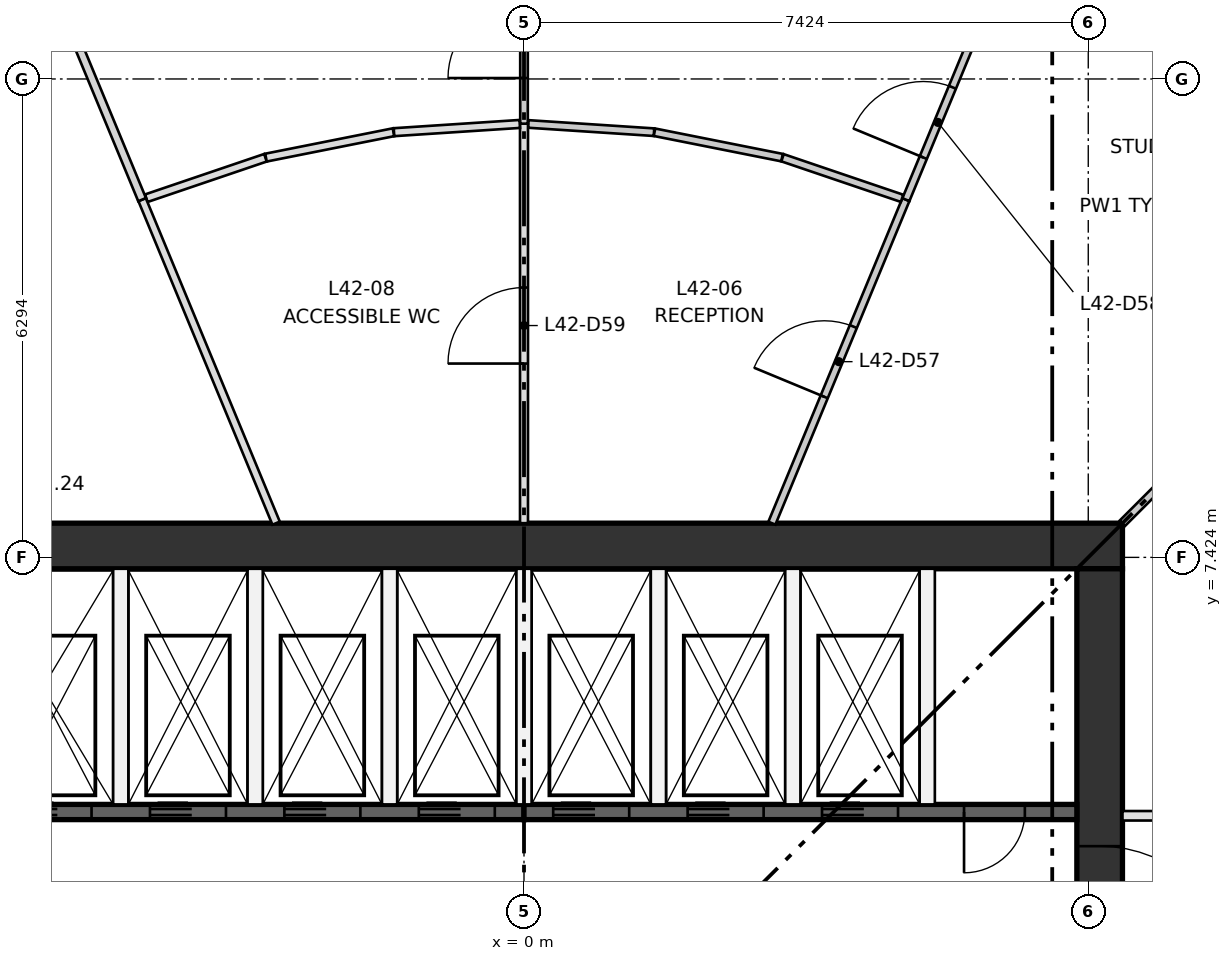
"""IFC4 building model, lengths in metres.
Left out: names, types, materials, properties, quantities, classifications, styles, units other than length and angle.
Written with IfcOpenShell. Run it as: python <this file> out.ifc"""

import sys

from ifc_helpers import new_model, si_unit, direction, frame, frame_2d, origin, place, context, subcontext, project, spatial, rectangle, extrude, element, fill, save


model = new_model("IFC4")
c1 = context("Model", 3, precision=1e-05, world=origin(), true_north=direction((0.0, 1.0)))
c2 = subcontext(c1, "Body", "Model", "MODEL_VIEW")
j1 = project(units=[si_unit("LENGTHUNIT", "METRE"), si_unit("PLANEANGLEUNIT", "RADIAN")], contexts=[c1])
p1 = place(None, origin())
s1 = spatial("IfcSite", under=j1, at=p1, CompositionType="ELEMENT")
p2 = place(p1, origin())
s2 = spatial("IfcBuilding", under=s1, at=p2, CompositionType="ELEMENT")
p3 = place(p2, frame((0.0, 0.0, 157.8)))
s3 = spatial("IfcBuildingStorey", under=s2, at=p3, CompositionType="ELEMENT", Elevation=157.8)
p4 = place(p3, frame((-7.874, 7.574, 0.0), z_axis=(0.0, 0.0, 1.0), x_axis=(1.0, 0.0, 0.0)))
e1 = element("IfcWall", 1, at=p4, inside=s3, PredefinedType="SHEAR", context=c2, shape_type="SweptSolid", body=[
    extrude(rectangle(XDim=15.748, YDim=0.6, at=frame_2d((7.874, 0.0))), origin(), (0.0, 0.0, 1.0), 3.35),
])
p5 = place(p3, frame((7.574, -7.274, 0.0), z_axis=(0.0, 0.0, 1.0), x_axis=(0.0, 1.0, 0.0)))
e2 = element("IfcWall", 2, at=p5, inside=s3, PredefinedType="SHEAR", context=c2, shape_type="SweptSolid", body=[
    extrude(rectangle(XDim=14.548, YDim=0.6, at=frame_2d((7.274, 0.0))), origin(), (0.0, 0.0, 1.0), 3.35),
])
p6 = place(p5, frame((6.774, 0.0, 0.0)))
e3 = element("IfcOpeningElement", 3, at=p6, cuts=e2, PredefinedType="OPENING", context=c2, shape_type="SweptSolid", body=[
    extrude(rectangle(XDim=1.0, YDim=2.1, at=frame_2d((0.5, 1.05))), frame((0.0, 0.31, 0.0), z_axis=(0.0, -1.0, 0.0), x_axis=(1.0, 0.0, 0.0)), (0.0, 0.0, 1.0), 0.62),
])
p7 = place(p5, frame((3.649, 0.0, 0.0)))
e4 = element("IfcOpeningElement", 4, at=p7, cuts=e2, PredefinedType="OPENING", context=c2, shape_type="SweptSolid", body=[
    extrude(rectangle(XDim=1.8, YDim=2.1, at=frame_2d((0.9, 1.05))), frame((0.0, 0.31, 0.0), z_axis=(0.0, -1.0, 0.0), x_axis=(1.0, 0.0, 0.0)), (0.0, 0.0, 1.0), 0.62),
])
p8 = place(p5, frame((9.098, 0.0, 0.0)))
e5 = element("IfcOpeningElement", 5, at=p8, cuts=e2, PredefinedType="OPENING", context=c2, shape_type="SweptSolid", body=[
    extrude(rectangle(XDim=1.8, YDim=2.1, at=frame_2d((0.9, 1.05))), frame((0.0, 0.31, 0.0), z_axis=(0.0, -1.0, 0.0), x_axis=(1.0, 0.0, 0.0)), (0.0, 0.0, 1.0), 0.62),
])
p9 = place(p3, frame((-7.274, 4.074, 0.0), z_axis=(0.0, 0.0, 1.0), x_axis=(1.0, 0.0, 0.0)))
e6 = element("IfcWall", 6, at=p9, inside=s3, PredefinedType="SHEAR", context=c2, shape_type="SweptSolid", body=[
    extrude(rectangle(XDim=7.274, YDim=0.2, at=frame_2d((3.637, 0.0))), origin(), (0.0, 0.0, 1.0), 3.0),
])
p10 = place(p9, frame((0.584, 0.0, 0.0)))
e7 = element("IfcOpeningElement", 7, at=p10, cuts=e6, PredefinedType="OPENING", context=c2, shape_type="SweptSolid", body=[
    extrude(rectangle(XDim=1.0, YDim=2.1, at=frame_2d((0.5, 1.05))), frame((0.0, 0.11, 0.0), z_axis=(0.0, -1.0, 0.0), x_axis=(1.0, 0.0, 0.0)), (0.0, 0.0, 1.0), 0.22),
])
p11 = place(p9, frame((2.353, 0.0, 0.0)))
e8 = element("IfcOpeningElement", 8, at=p11, cuts=e6, PredefinedType="OPENING", context=c2, shape_type="SweptSolid", body=[
    extrude(rectangle(XDim=1.0, YDim=2.1, at=frame_2d((0.5, 1.05))), frame((0.0, 0.11, 0.0), z_axis=(0.0, -1.0, 0.0), x_axis=(1.0, 0.0, 0.0)), (0.0, 0.0, 1.0), 0.22),
])
p12 = place(p9, frame((4.121, 0.0, 0.0)))
e9 = element("IfcOpeningElement", 9, at=p12, cuts=e6, PredefinedType="OPENING", context=c2, shape_type="SweptSolid", body=[
    extrude(rectangle(XDim=1.0, YDim=2.1, at=frame_2d((0.5, 1.05))), frame((0.0, 0.11, 0.0), z_axis=(0.0, -1.0, 0.0), x_axis=(1.0, 0.0, 0.0)), (0.0, 0.0, 1.0), 0.22),
])
p13 = place(p9, frame((5.89, 0.0, 0.0)))
e10 = element("IfcOpeningElement", 10, at=p13, cuts=e6, PredefinedType="OPENING", context=c2, shape_type="SweptSolid", body=[
    extrude(rectangle(XDim=1.0, YDim=2.1, at=frame_2d((0.5, 1.05))), frame((0.0, 0.11, 0.0), z_axis=(0.0, -1.0, 0.0), x_axis=(1.0, 0.0, 0.0)), (0.0, 0.0, 1.0), 0.22),
])
p14 = place(p3, frame((0.0, 4.074, 0.0), z_axis=(0.0, 0.0, 1.0), x_axis=(1.0, 0.0, 0.0)))
e11 = element("IfcWall", 11, at=p14, inside=s3, PredefinedType="SHEAR", context=c2, shape_type="SweptSolid", body=[
    extrude(rectangle(XDim=7.274, YDim=0.2, at=frame_2d((3.637, 0.0))), origin(), (0.0, 0.0, 1.0), 3.0),
])
p15 = place(p14, frame((0.384, 0.0, 0.0)))
e12 = element("IfcOpeningElement", 12, at=p15, cuts=e11, PredefinedType="OPENING", context=c2, shape_type="SweptSolid", body=[
    extrude(rectangle(XDim=1.0, YDim=2.1, at=frame_2d((0.5, 1.05))), frame((0.0, 0.11, 0.0), z_axis=(0.0, -1.0, 0.0), x_axis=(1.0, 0.0, 0.0)), (0.0, 0.0, 1.0), 0.22),
])
p16 = place(p14, frame((2.153, 0.0, 0.0)))
e13 = element("IfcOpeningElement", 13, at=p16, cuts=e11, PredefinedType="OPENING", context=c2, shape_type="SweptSolid", body=[
    extrude(rectangle(XDim=1.0, YDim=2.1, at=frame_2d((0.5, 1.05))), frame((0.0, 0.11, 0.0), z_axis=(0.0, -1.0, 0.0), x_axis=(1.0, 0.0, 0.0)), (0.0, 0.0, 1.0), 0.22),
])
p17 = place(p14, frame((3.921, 0.0, 0.0)))
e14 = element("IfcOpeningElement", 14, at=p17, cuts=e11, PredefinedType="OPENING", context=c2, shape_type="SweptSolid", body=[
    extrude(rectangle(XDim=1.0, YDim=2.1, at=frame_2d((0.5, 1.05))), frame((0.0, 0.11, 0.0), z_axis=(0.0, -1.0, 0.0), x_axis=(1.0, 0.0, 0.0)), (0.0, 0.0, 1.0), 0.22),
])
p18 = place(p14, frame((5.79, 0.0, 0.0)))
e15 = element("IfcOpeningElement", 15, at=p18, cuts=e11, PredefinedType="OPENING", context=c2, shape_type="SweptSolid", body=[
    extrude(rectangle(XDim=0.8, YDim=2.1, at=frame_2d((0.4, 1.05))), frame((0.0, 0.11, 0.0), z_axis=(0.0, -1.0, 0.0), x_axis=(1.0, 0.0, 0.0)), (0.0, 0.0, 1.0), 0.22),
])
for number, where, z_axis, x_axis in (
    (16, (-5.305, 4.174, 0.0), (0.0, 0.0, 1.0), (0.0, 1.0, 0.0)),
    (17, (-3.537, 4.174, 0.0), (0.0, 0.0, 1.0), (0.0, 1.0, 0.0)),
    (18, (-1.769, 4.174, 0.0), (0.0, 0.0, 1.0), (0.0, 1.0, 0.0)),
    (19, (0.0, 4.174, 0.0), (0.0, 0.0, 1.0), (0.0, 1.0, 0.0)),
    (20, (1.769, 4.174, 0.0), (0.0, 0.0, 1.0), (0.0, 1.0, 0.0)),
    (21, (3.537, 4.174, 0.0), (0.0, 0.0, 1.0), (0.0, 1.0, 0.0)),
    (22, (5.305, 4.174, 0.0), (0.0, 0.0, 1.0), (0.0, 1.0, 0.0)),
):
    element("IfcWall", number, at=place(p3, frame(where, z_axis=z_axis, x_axis=x_axis)), inside=s3, PredefinedType="PARTITIONING", context=c2, shape_type="SweptSolid", body=[
        extrude(rectangle(XDim=3.1, YDim=0.2, at=frame_2d((1.55, 0.0))), origin(), (0.0, 0.0, 1.0), 3.0),
    ])
p19 = place(p3, frame((7.874, 4.024, 0.0), z_axis=(0.0, 0.0, 1.0), x_axis=(1.0, 0.0, 0.0)))
e23 = element("IfcWall", 23, at=p19, inside=s3, PredefinedType="PARTITIONING", context=c2, shape_type="SweptSolid", body=[
    extrude(rectangle(XDim=5.036, YDim=0.125, at=frame_2d((2.518, 0.0))), origin(), (0.0, 0.0, 1.0), 3.0),
])
p20 = place(p19, frame((2.0, 0.0, 0.0)))
e24 = element("IfcOpeningElement", 24, at=p20, cuts=e23, PredefinedType="OPENING", context=c2, shape_type="SweptSolid", body=[
    extrude(rectangle(XDim=1.0, YDim=2.1, at=frame_2d((0.5, 1.05))), frame((0.0, 0.073, 0.0), z_axis=(0.0, -1.0, 0.0), x_axis=(1.0, 0.0, 0.0)), (0.0, 0.0, 1.0), 0.145),
])
p21 = place(p3, frame((7.874, 7.874, 0.0), z_axis=(0.0, 0.0, 1.0), x_axis=(0.707106781187, 0.707106781187, 0.0)))
e25 = element("IfcWall", 25, at=p21, inside=s3, PredefinedType="PARTITIONING", context=c2, shape_type="SweptSolid", body=[
    extrude(rectangle(XDim=6.564, YDim=0.1, at=frame_2d((3.282, 0.0))), origin(), (0.0, 0.0, 1.0), 3.0),
])
p22 = place(p21, frame((2.5, 0.0, 0.0)))
e26 = element("IfcOpeningElement", 26, at=p22, cuts=e25, PredefinedType="OPENING", context=c2, shape_type="SweptSolid", body=[
    extrude(rectangle(XDim=1.0, YDim=2.1, at=frame_2d((0.5, 1.05))), frame((0.0, 0.06, 0.0), z_axis=(0.0, -1.0, 0.0), x_axis=(1.0, 0.0, 0.0)), (0.0, 0.0, 1.0), 0.12),
])
p23 = place(p3, frame((3.261, 7.874, 0.0), z_axis=(0.0, 0.0, 1.0), x_axis=(0.382691869474, 0.923876037701, 0.0)))
e27 = element("IfcWall", 27, at=p23, inside=s3, PredefinedType="PARTITIONING", context=c2, shape_type="SweptSolid", body=[
    extrude(rectangle(XDim=4.607, YDim=0.1, at=frame_2d((2.304, 0.0))), origin(), (0.0, 0.0, 1.0), 3.0),
])
p24 = place(p23, frame((1.8, 0.0, 0.0)))
e28 = element("IfcOpeningElement", 28, at=p24, cuts=e27, PredefinedType="OPENING", context=c2, shape_type="SweptSolid", body=[
    extrude(rectangle(XDim=1.0, YDim=2.1, at=frame_2d((0.5, 1.05))), frame((0.0, 0.06, 0.0), z_axis=(0.0, -1.0, 0.0), x_axis=(1.0, 0.0, 0.0)), (0.0, 0.0, 1.0), 0.12),
])
p25 = place(p3, frame((5.025, 12.131, 0.0), z_axis=(0.0, 0.0, 1.0), x_axis=(0.382664766489, 0.923887263949, 0.0)))
e29 = element("IfcWall", 29, at=p25, inside=s3, PredefinedType="PARTITIONING", context=c2, shape_type="SweptSolid", body=[
    extrude(rectangle(XDim=4.57, YDim=0.1, at=frame_2d((2.285, 0.0))), origin(), (0.0, 0.0, 1.0), 3.0),
])
p26 = place(p25, frame((0.6, 0.0, 0.0)))
e30 = element("IfcOpeningElement", 30, at=p26, cuts=e29, PredefinedType="OPENING", context=c2, shape_type="SweptSolid", body=[
    extrude(rectangle(XDim=1.0, YDim=2.1, at=frame_2d((0.5, 1.05))), frame((0.0, 0.06, 0.0), z_axis=(0.0, -1.0, 0.0), x_axis=(1.0, 0.0, 0.0)), (0.0, 0.0, 1.0), 0.12),
])
p27 = place(p3, frame((0.056, 13.126, 0.0), z_axis=(0.0, 0.0, 1.0), x_axis=(0.997860729897, -0.065375559108, 0.0)))
e31 = element("IfcWall", 31, at=p27, inside=s3, PredefinedType="PARTITIONING", context=c2, shape_type="SweptSolid", body=[
    extrude(rectangle(XDim=1.658, YDim=0.1, at=frame_2d((0.829, 0.0))), origin(), (0.0, 0.0, 1.0), 3.0),
])
p28 = place(p3, frame((1.717, 13.017, 0.0), z_axis=(0.0, 0.0, 1.0), x_axis=(0.980761373858, -0.195210469873, 0.0)))
e32 = element("IfcWall", 32, at=p28, inside=s3, PredefinedType="PARTITIONING", context=c2, shape_type="SweptSolid", body=[
    extrude(rectangle(XDim=1.711, YDim=0.1, at=frame_2d((0.855, 0.0))), origin(), (0.0, 0.0, 1.0), 3.0),
])
p29 = place(p3, frame((3.401, 12.681, 0.0), z_axis=(0.0, 0.0, 1.0), x_axis=(0.946964323191, -0.321338716314, 0.0)))
e33 = element("IfcWall", 33, at=p29, inside=s3, PredefinedType="PARTITIONING", context=c2, shape_type="SweptSolid", body=[
    extrude(rectangle(XDim=1.661, YDim=0.1, at=frame_2d((0.831, 0.0))), origin(), (0.0, 0.0, 1.0), 3.0),
])
p30 = place(p3, frame((0.0, 7.874, 0.0), z_axis=(0.0, 0.0, 1.0), x_axis=(0.0, 1.0, 0.0)))
e34 = element("IfcWall", 34, at=p30, inside=s3, PredefinedType="PARTITIONING", context=c2, shape_type="SweptSolid", body=[
    extrude(rectangle(XDim=5.256, YDim=0.105, at=frame_2d((2.628, 0.0))), origin(), (0.0, 0.0, 1.0), 3.0),
])
p31 = place(p30, frame((2.1, 0.0, 0.0)))
e35 = element("IfcOpeningElement", 35, at=p31, cuts=e34, PredefinedType="OPENING", context=c2, shape_type="SweptSolid", body=[
    extrude(rectangle(XDim=1.0, YDim=2.1, at=frame_2d((0.5, 1.05))), frame((0.0, 0.062, 0.0), z_axis=(0.0, -1.0, 0.0), x_axis=(1.0, 0.0, 0.0)), (0.0, 0.0, 1.0), 0.125),
])
p32 = place(p3, frame((0.0, 13.13, 0.0), z_axis=(0.0, 0.0, 1.0), x_axis=(0.0, 1.0, 0.0)))
e36 = element("IfcWall", 36, at=p32, inside=s3, PredefinedType="PARTITIONING", context=c2, shape_type="SweptSolid", body=[
    extrude(rectangle(XDim=4.57, YDim=0.1, at=frame_2d((2.285, 0.0))), origin(), (0.0, 0.0, 1.0), 3.0),
])
p33 = place(p32, frame((0.6, 0.0, 0.0)))
e37 = element("IfcOpeningElement", 37, at=p33, cuts=e36, PredefinedType="OPENING", context=c2, shape_type="SweptSolid", body=[
    extrude(rectangle(XDim=1.0, YDim=2.1, at=frame_2d((0.5, 1.05))), frame((0.0, 0.06, 0.0), z_axis=(0.0, -1.0, 0.0), x_axis=(1.0, 0.0, 0.0)), (0.0, 0.0, 1.0), 0.12),
])
p34 = place(p3, frame((-4.969, 12.149, 0.0), z_axis=(0.0, 0.0, 1.0), x_axis=(0.946958666381, 0.321355386084, 0.0)))
e38 = element("IfcWall", 38, at=p34, inside=s3, PredefinedType="PARTITIONING", context=c2, shape_type="SweptSolid", body=[
    extrude(rectangle(XDim=1.656, YDim=0.105, at=frame_2d((0.828, 0.0))), origin(), (0.0, 0.0, 1.0), 3.0),
])
p35 = place(p3, frame((-3.395, 12.683, 0.0), z_axis=(0.0, 0.0, 1.0), x_axis=(0.980783253741, 0.195100510458, 0.0)))
e39 = element("IfcWall", 39, at=p35, inside=s3, PredefinedType="PARTITIONING", context=c2, shape_type="SweptSolid", body=[
    extrude(rectangle(XDim=1.711, YDim=0.105, at=frame_2d((0.855, 0.0))), origin(), (0.0, 0.0, 1.0), 3.0),
])
p36 = place(p3, frame((-1.71, 13.018, 0.0), z_axis=(0.0, 0.0, 1.0), x_axis=(0.997860729897, 0.065375559108, 0.0)))
e40 = element("IfcWall", 40, at=p36, inside=s3, PredefinedType="PARTITIONING", context=c2, shape_type="SweptSolid", body=[
    extrude(rectangle(XDim=1.658, YDim=0.105, at=frame_2d((0.829, 0.0))), origin(), (0.0, 0.0, 1.0), 3.0),
])
p37 = place(p3, frame((-3.261, 7.874, 0.0), z_axis=(0.0, 0.0, 1.0), x_axis=(-0.382691869474, 0.923876037701, 0.0)))
e41 = element("IfcWall", 41, at=p37, inside=s3, PredefinedType="PARTITIONING", context=c2, shape_type="SweptSolid", body=[
    extrude(rectangle(XDim=4.607, YDim=0.105, at=frame_2d((2.304, 0.0))), origin(), (0.0, 0.0, 1.0), 3.0),
])
p38 = place(p3, frame((-5.025, 12.131, 0.0), z_axis=(0.0, 0.0, 1.0), x_axis=(-0.382664766489, 0.923887263949, 0.0)))
e42 = element("IfcWall", 42, at=p38, inside=s3, PredefinedType="PARTITIONING", context=c2, shape_type="SweptSolid", body=[
    extrude(rectangle(XDim=4.57, YDim=0.11, at=frame_2d((2.285, 0.0))), origin(), (0.0, 0.0, 1.0), 3.0),
])
p39 = place(p10, frame((1.0, 0.0, 0.0), z_axis=(0.0, 0.0, 1.0), x_axis=(-1.0, 0.0, 0.0)))
e43 = element("IfcDoor", 43, at=p39, inside=s3, OperationType="DOUBLE_DOOR_SLIDING", PredefinedType="DOOR", context=c2, shape_type="SweptSolid", body=[
    extrude(rectangle(XDim=1.0, YDim=2.1, at=frame_2d((0.5, 1.05))), frame((0.0, 0.025, 0.0), z_axis=(0.0, -1.0, 0.0), x_axis=(1.0, 0.0, 0.0)), (0.0, 0.0, 1.0), 0.05),
])
fill(e7, e43)
p40 = place(p11, frame((1.0, 0.0, 0.0), z_axis=(0.0, 0.0, 1.0), x_axis=(-1.0, 0.0, 0.0)))
e44 = element("IfcDoor", 44, at=p40, inside=s3, OperationType="DOUBLE_DOOR_SLIDING", PredefinedType="DOOR", context=c2, shape_type="SweptSolid", body=[
    extrude(rectangle(XDim=1.0, YDim=2.1, at=frame_2d((0.5, 1.05))), frame((0.0, 0.025, 0.0), z_axis=(0.0, -1.0, 0.0), x_axis=(1.0, 0.0, 0.0)), (0.0, 0.0, 1.0), 0.05),
])
fill(e8, e44)
p41 = place(p12, frame((1.0, 0.0, 0.0), z_axis=(0.0, 0.0, 1.0), x_axis=(-1.0, 0.0, 0.0)))
e45 = element("IfcDoor", 45, at=p41, inside=s3, OperationType="DOUBLE_DOOR_SLIDING", PredefinedType="DOOR", context=c2, shape_type="SweptSolid", body=[
    extrude(rectangle(XDim=1.0, YDim=2.1, at=frame_2d((0.5, 1.05))), frame((0.0, 0.025, 0.0), z_axis=(0.0, -1.0, 0.0), x_axis=(1.0, 0.0, 0.0)), (0.0, 0.0, 1.0), 0.05),
])
fill(e9, e45)
p42 = place(p13, frame((1.0, 0.0, 0.0), z_axis=(0.0, 0.0, 1.0), x_axis=(-1.0, 0.0, 0.0)))
e46 = element("IfcDoor", 46, at=p42, inside=s3, OperationType="DOUBLE_DOOR_SLIDING", PredefinedType="DOOR", context=c2, shape_type="SweptSolid", body=[
    extrude(rectangle(XDim=1.0, YDim=2.1, at=frame_2d((0.5, 1.05))), frame((0.0, 0.025, 0.0), z_axis=(0.0, -1.0, 0.0), x_axis=(1.0, 0.0, 0.0)), (0.0, 0.0, 1.0), 0.05),
])
fill(e10, e46)
p43 = place(p15, frame((1.0, 0.0, 0.0), z_axis=(0.0, 0.0, 1.0), x_axis=(-1.0, 0.0, 0.0)))
e47 = element("IfcDoor", 47, at=p43, inside=s3, OperationType="DOUBLE_DOOR_SLIDING", PredefinedType="DOOR", context=c2, shape_type="SweptSolid", body=[
    extrude(rectangle(XDim=1.0, YDim=2.1, at=frame_2d((0.5, 1.05))), frame((0.0, 0.025, 0.0), z_axis=(0.0, -1.0, 0.0), x_axis=(1.0, 0.0, 0.0)), (0.0, 0.0, 1.0), 0.05),
])
fill(e12, e47)
p44 = place(p16, frame((1.0, 0.0, 0.0), z_axis=(0.0, 0.0, 1.0), x_axis=(-1.0, 0.0, 0.0)))
e48 = element("IfcDoor", 48, at=p44, inside=s3, OperationType="DOUBLE_DOOR_SLIDING", PredefinedType="DOOR", context=c2, shape_type="SweptSolid", body=[
    extrude(rectangle(XDim=1.0, YDim=2.1, at=frame_2d((0.5, 1.05))), frame((0.0, 0.025, 0.0), z_axis=(0.0, -1.0, 0.0), x_axis=(1.0, 0.0, 0.0)), (0.0, 0.0, 1.0), 0.05),
])
fill(e13, e48)
p45 = place(p17, frame((1.0, 0.0, 0.0), z_axis=(0.0, 0.0, 1.0), x_axis=(-1.0, 0.0, 0.0)))
e49 = element("IfcDoor", 49, at=p45, inside=s3, OperationType="DOUBLE_DOOR_SLIDING", PredefinedType="DOOR", context=c2, shape_type="SweptSolid", body=[
    extrude(rectangle(XDim=1.0, YDim=2.1, at=frame_2d((0.5, 1.05))), frame((0.0, 0.025, 0.0), z_axis=(0.0, -1.0, 0.0), x_axis=(1.0, 0.0, 0.0)), (0.0, 0.0, 1.0), 0.05),
])
fill(e14, e49)
p46 = place(p18, frame((0.8, 0.0, 0.0), z_axis=(0.0, 0.0, 1.0), x_axis=(-1.0, 0.0, 0.0)))
e50 = element("IfcDoor", 50, at=p46, inside=s3, OperationType="SINGLE_SWING_LEFT", PredefinedType="DOOR", context=c2, shape_type="SweptSolid", body=[
    extrude(rectangle(XDim=0.8, YDim=2.1, at=frame_2d((0.4, 1.05))), frame((0.0, 0.025, 0.0), z_axis=(0.0, -1.0, 0.0), x_axis=(1.0, 0.0, 0.0)), (0.0, 0.0, 1.0), 0.05),
])
fill(e15, e50)
p47 = place(p8, frame((1.8, 0.0, 0.0), z_axis=(0.0, 0.0, 1.0), x_axis=(-1.0, 0.0, 0.0)))
e51 = element("IfcDoor", 51, at=p47, inside=s3, OperationType="DOUBLE_DOOR_SINGLE_SWING", PredefinedType="DOOR", context=c2, shape_type="SweptSolid", body=[
    extrude(rectangle(XDim=1.8, YDim=2.1, at=frame_2d((0.9, 1.05))), frame((0.0, 0.025, 0.0), z_axis=(0.0, -1.0, 0.0), x_axis=(1.0, 0.0, 0.0)), (0.0, 0.0, 1.0), 0.05),
])
fill(e5, e51)
p48 = place(p24, origin())
e52 = element("IfcDoor", 52, at=p48, inside=s3, OperationType="SINGLE_SWING_LEFT", PredefinedType="DOOR", context=c2, shape_type="SweptSolid", body=[
    extrude(rectangle(XDim=1.0, YDim=2.1, at=frame_2d((0.5, 1.05))), frame((0.0, 0.025, 0.0), z_axis=(0.0, -1.0, 0.0), x_axis=(1.0, 0.0, 0.0)), (0.0, 0.0, 1.0), 0.05),
])
fill(e28, e52)
p49 = place(p26, origin())
e53 = element("IfcDoor", 53, at=p49, inside=s3, OperationType="SINGLE_SWING_LEFT", PredefinedType="DOOR", context=c2, shape_type="SweptSolid", body=[
    extrude(rectangle(XDim=1.0, YDim=2.1, at=frame_2d((0.5, 1.05))), frame((0.0, 0.025, 0.0), z_axis=(0.0, -1.0, 0.0), x_axis=(1.0, 0.0, 0.0)), (0.0, 0.0, 1.0), 0.05),
])
fill(e30, e53)
p50 = place(p31, origin())
e54 = element("IfcDoor", 54, at=p50, inside=s3, OperationType="SINGLE_SWING_LEFT", PredefinedType="DOOR", context=c2, shape_type="SweptSolid", body=[
    extrude(rectangle(XDim=1.0, YDim=2.1, at=frame_2d((0.5, 1.05))), frame((0.0, 0.025, 0.0), z_axis=(0.0, -1.0, 0.0), x_axis=(1.0, 0.0, 0.0)), (0.0, 0.0, 1.0), 0.05),
])
fill(e35, e54)
p51 = place(p33, origin())
e55 = element("IfcDoor", 55, at=p51, inside=s3, OperationType="SINGLE_SWING_LEFT", PredefinedType="DOOR", context=c2, shape_type="SweptSolid", body=[
    extrude(rectangle(XDim=1.0, YDim=2.1, at=frame_2d((0.5, 1.05))), frame((0.0, 0.025, 0.0), z_axis=(0.0, -1.0, 0.0), x_axis=(1.0, 0.0, 0.0)), (0.0, 0.0, 1.0), 0.05),
])
fill(e37, e55)
save(model, sys.argv[1])
